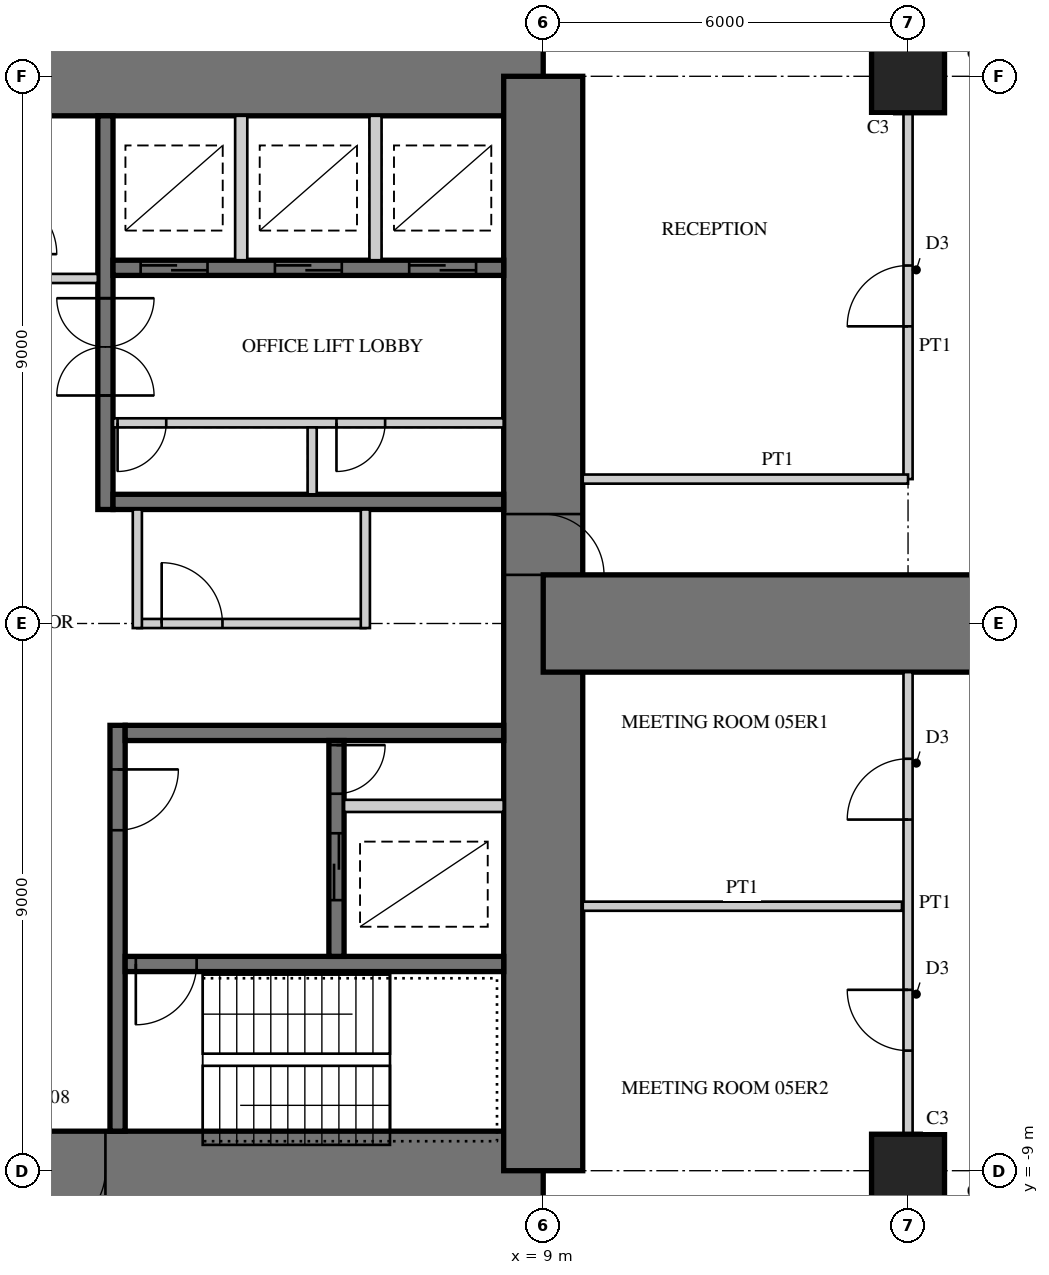
"""IFC4 building model, lengths in metres.
Left out: names, types, materials, properties, quantities, classifications, styles, units other than length and angle.
Written with IfcOpenShell. Run it as: python <this file> out.ifc"""

import sys

from ifc_helpers import new_model, si_unit, direction, frame, frame_2d, origin, origin_2d, place, context, subcontext, project, spatial, rectangle, extrude, element, fill, save


model = new_model("IFC4")
c1 = context("Model", 3, precision=1e-05, world=origin(), true_north=direction((0.0, 1.0)))
c2 = subcontext(c1, "Body", "Model", "MODEL_VIEW")
j1 = project(units=[si_unit("LENGTHUNIT", "METRE"), si_unit("PLANEANGLEUNIT", "RADIAN")], contexts=[c1])
p1 = place(None, origin())
s1 = spatial("IfcSite", under=j1, at=p1, CompositionType="ELEMENT")
p2 = place(p1, origin())
s2 = spatial("IfcBuilding", under=s1, at=p2, CompositionType="ELEMENT")
p3 = place(p2, frame((0.0, 0.0, 23.5)))
s3 = spatial("IfcBuildingStorey", under=s2, at=p3, CompositionType="ELEMENT", Elevation=23.5)
p4 = place(p3, frame((9.0, 9.0, 0.0), z_axis=(0.0, 0.0, 1.0), x_axis=(-1.0, 0.0, 0.0)))
e1 = element("IfcWall", 1, at=p4, inside=s3, PredefinedType="SHEAR", context=c2, shape_type="SweptSolid", body=[
    extrude(rectangle(XDim=18.0, YDim=1.3, at=frame_2d((9.0, 0.0))), origin(), (0.0, 0.0, 1.0), 4.0),
])
p5 = place(p4, frame((9.8, 0.0, 0.0)))
e2 = element("IfcOpeningElement", 2, at=p5, cuts=e1, PredefinedType="OPENING", context=c2, shape_type="SweptSolid", body=[
    extrude(rectangle(XDim=1.0, YDim=2.4, at=frame_2d((0.5, 1.2))), frame((0.0, 0.66, 0.0), z_axis=(0.0, -1.0, 0.0), x_axis=(1.0, 0.0, 0.0)), (0.0, 0.0, 1.0), 1.32),
])
p6 = place(p3, frame((-9.0, -9.0, 0.0), z_axis=(0.0, 0.0, 1.0), x_axis=(1.0, 0.0, 0.0)))
e3 = element("IfcWall", 3, at=p6, inside=s3, PredefinedType="SHEAR", context=c2, shape_type="SweptSolid", body=[
    extrude(rectangle(XDim=18.0, YDim=1.3, at=frame_2d((9.0, 0.0))), origin(), (0.0, 0.0, 1.0), 4.0),
])
p7 = place(p6, frame((9.8, 0.0, 0.0)))
e4 = element("IfcOpeningElement", 4, at=p7, cuts=e3, PredefinedType="OPENING", context=c2, shape_type="SweptSolid", body=[
    extrude(rectangle(XDim=1.0, YDim=2.4, at=frame_2d((0.5, 1.2))), frame((0.0, 0.66, 0.0), z_axis=(0.0, -1.0, 0.0), x_axis=(1.0, 0.0, 0.0)), (0.0, 0.0, 1.0), 1.32),
])
p8 = place(p3, frame((9.0, -9.0, 0.0), z_axis=(0.0, 0.0, 1.0), x_axis=(0.0, 1.0, 0.0)))
e5 = element("IfcWall", 5, at=p8, inside=s3, PredefinedType="SHEAR", context=c2, shape_type="SweptSolid", body=[
    extrude(rectangle(XDim=18.0, YDim=1.3, at=frame_2d((9.0, 0.0))), origin(), (0.0, 0.0, 1.0), 4.0),
])
p9 = place(p8, frame((9.8, 0.0, 0.0)))
e6 = element("IfcOpeningElement", 6, at=p9, cuts=e5, PredefinedType="OPENING", context=c2, shape_type="SweptSolid", body=[
    extrude(rectangle(XDim=1.0, YDim=2.4, at=frame_2d((0.5, 1.2))), frame((0.0, 0.66, 0.0), z_axis=(0.0, -1.0, 0.0), x_axis=(1.0, 0.0, 0.0)), (0.0, 0.0, 1.0), 1.32),
])
p10 = place(p3, frame((1.8, 1.875, 0.0), z_axis=(0.0, 0.0, 1.0), x_axis=(0.0, 1.0, 0.0)))
e7 = element("IfcWall", 7, at=p10, inside=s3, PredefinedType="SHEAR", context=c2, shape_type="SweptSolid", body=[
    extrude(rectangle(XDim=6.475, YDim=0.25, at=frame_2d((3.238, 0.0))), origin(), (0.0, 0.0, 1.0), 4.0),
])
p11 = place(p10, frame((1.875, 0.0, 0.0)))
e8 = element("IfcOpeningElement", 8, at=p11, cuts=e7, PredefinedType="OPENING", context=c2, shape_type="SweptSolid", body=[
    extrude(rectangle(XDim=1.6, YDim=2.4, at=frame_2d((0.8, 1.2))), frame((0.0, 0.135, 0.0), z_axis=(0.0, -1.0, 0.0), x_axis=(1.0, 0.0, 0.0)), (0.0, 0.0, 1.0), 0.27),
])
p12 = place(p3, frame((1.925, 2.0, 0.0), z_axis=(0.0, 0.0, 1.0), x_axis=(1.0, 0.0, 0.0)))
e9 = element("IfcWall", 9, at=p12, inside=s3, PredefinedType="SHEAR", context=c2, shape_type="SweptSolid", body=[
    extrude(rectangle(XDim=6.425, YDim=0.25, at=frame_2d((3.212, 0.0))), origin(), (0.0, 0.0, 1.0), 4.0),
])
p13 = place(p3, frame((1.925, 5.85, 0.0), z_axis=(0.0, 0.0, 1.0), x_axis=(1.0, 0.0, 0.0)))
e10 = element("IfcWall", 10, at=p13, inside=s3, PredefinedType="SHEAR", context=c2, shape_type="SweptSolid", body=[
    extrude(rectangle(XDim=6.425, YDim=0.25, at=frame_2d((3.212, 0.0))), origin(), (0.0, 0.0, 1.0), 4.0),
])
p14 = place(p13, frame((0.454, 0.0, 0.0)))
e11 = element("IfcOpeningElement", 11, at=p14, cuts=e10, PredefinedType="OPENING", context=c2, shape_type="SweptSolid", body=[
    extrude(rectangle(XDim=1.1, YDim=2.2, at=frame_2d((0.55, 1.1))), frame((0.0, 0.135, 0.0), z_axis=(0.0, -1.0, 0.0), x_axis=(1.0, 0.0, 0.0)), (0.0, 0.0, 1.0), 0.27),
])
p15 = place(p13, frame((2.663, 0.0, 0.0)))
e12 = element("IfcOpeningElement", 12, at=p15, cuts=e10, PredefinedType="OPENING", context=c2, shape_type="SweptSolid", body=[
    extrude(rectangle(XDim=1.1, YDim=2.2, at=frame_2d((0.55, 1.1))), frame((0.0, 0.135, 0.0), z_axis=(0.0, -1.0, 0.0), x_axis=(1.0, 0.0, 0.0)), (0.0, 0.0, 1.0), 0.27),
])
p16 = place(p13, frame((4.871, 0.0, 0.0)))
e13 = element("IfcOpeningElement", 13, at=p16, cuts=e10, PredefinedType="OPENING", context=c2, shape_type="SweptSolid", body=[
    extrude(rectangle(XDim=1.1, YDim=2.2, at=frame_2d((0.55, 1.1))), frame((0.0, 0.135, 0.0), z_axis=(0.0, -1.0, 0.0), x_axis=(1.0, 0.0, 0.0)), (0.0, 0.0, 1.0), 0.27),
])
p17 = place(p3, frame((1.925, 3.3, 0.0), z_axis=(0.0, 0.0, 1.0), x_axis=(1.0, 0.0, 0.0)))
e14 = element("IfcWall", 14, at=p17, inside=s3, PredefinedType="PARTITIONING", context=c2, shape_type="SweptSolid", body=[
    extrude(rectangle(XDim=6.425, YDim=0.15, at=frame_2d((3.212, 0.0))), origin(), (0.0, 0.0, 1.0), 4.0),
])
p18 = place(p17, frame((0.075, 0.0, 0.0)))
e15 = element("IfcOpeningElement", 15, at=p18, cuts=e14, PredefinedType="OPENING", context=c2, shape_type="SweptSolid", body=[
    extrude(rectangle(XDim=0.8, YDim=2.1, at=frame_2d((0.4, 1.05))), frame((0.0, 0.085, 0.0), z_axis=(0.0, -1.0, 0.0), x_axis=(1.0, 0.0, 0.0)), (0.0, 0.0, 1.0), 0.17),
])
p19 = place(p17, frame((3.675, 0.0, 0.0)))
e16 = element("IfcOpeningElement", 16, at=p19, cuts=e14, PredefinedType="OPENING", context=c2, shape_type="SweptSolid", body=[
    extrude(rectangle(XDim=0.8, YDim=2.1, at=frame_2d((0.4, 1.05))), frame((0.0, 0.085, 0.0), z_axis=(0.0, -1.0, 0.0), x_axis=(1.0, 0.0, 0.0)), (0.0, 0.0, 1.0), 0.17),
])
p20 = place(p3, frame((5.2, 2.125, 0.0), z_axis=(0.0, 0.0, 1.0), x_axis=(0.0, 1.0, 0.0)))
e17 = element("IfcWall", 17, at=p20, inside=s3, PredefinedType="PARTITIONING", context=c2, shape_type="SweptSolid", body=[
    extrude(rectangle(XDim=1.1, YDim=0.15, at=frame_2d((0.55, 0.0))), origin(), (0.0, 0.0, 1.0), 4.0),
])
for number, where, z_axis, x_axis in (
    (18, (4.033, 5.975, 0.0), (0.0, 0.0, 1.0), (0.0, 1.0, 0.0)),
    (19, (6.242, 5.975, 0.0), (0.0, 0.0, 1.0), (0.0, 1.0, 0.0)),
):
    element("IfcWall", number, at=place(p3, frame(where, z_axis=z_axis, x_axis=x_axis)), inside=s3, PredefinedType="PARTITIONING", context=c2, shape_type="SweptSolid", body=[
        extrude(rectangle(XDim=2.375, YDim=0.2, at=frame_2d((1.188, 0.0))), origin(), (0.0, 0.0, 1.0), 4.0),
    ])
p21 = place(p3, frame((2.0, -1.675, 0.0), z_axis=(0.0, 0.0, 1.0), x_axis=(0.0, -1.0, 0.0)))
e20 = element("IfcWall", 20, at=p21, inside=s3, PredefinedType="SHEAR", context=c2, shape_type="SweptSolid", body=[
    extrude(rectangle(XDim=6.675, YDim=0.25, at=frame_2d((3.337, 0.0))), origin(), (0.0, 0.0, 1.0), 4.0),
])
p22 = place(p21, frame((0.725, 0.0, 0.0)))
e21 = element("IfcOpeningElement", 21, at=p22, cuts=e20, PredefinedType="OPENING", context=c2, shape_type="SweptSolid", body=[
    extrude(rectangle(XDim=1.0, YDim=2.1, at=frame_2d((0.5, 1.05))), frame((0.0, 0.135, 0.0), z_axis=(0.0, -1.0, 0.0), x_axis=(1.0, 0.0, 0.0)), (0.0, 0.0, 1.0), 0.27),
])
p23 = place(p3, frame((2.125, -1.8, 0.0), z_axis=(0.0, 0.0, 1.0), x_axis=(1.0, 0.0, 0.0)))
e22 = element("IfcWall", 22, at=p23, inside=s3, PredefinedType="SHEAR", context=c2, shape_type="SweptSolid", body=[
    extrude(rectangle(XDim=6.225, YDim=0.25, at=frame_2d((3.113, 0.0))), origin(), (0.0, 0.0, 1.0), 4.0),
])
p24 = place(p3, frame((2.125, -5.6, 0.0), z_axis=(0.0, 0.0, 1.0), x_axis=(1.0, 0.0, 0.0)))
e23 = element("IfcWall", 23, at=p24, inside=s3, PredefinedType="SHEAR", context=c2, shape_type="SweptSolid", body=[
    extrude(rectangle(XDim=6.225, YDim=0.25, at=frame_2d((3.113, 0.0))), origin(), (0.0, 0.0, 1.0), 4.0),
])
p25 = place(p24, frame((0.175, 0.0, 0.0)))
e24 = element("IfcOpeningElement", 24, at=p25, cuts=e23, PredefinedType="OPENING", context=c2, shape_type="SweptSolid", body=[
    extrude(rectangle(XDim=1.0, YDim=2.1, at=frame_2d((0.5, 1.05))), frame((0.0, 0.135, 0.0), z_axis=(0.0, -1.0, 0.0), x_axis=(1.0, 0.0, 0.0)), (0.0, 0.0, 1.0), 0.27),
])
p26 = place(p3, frame((5.6, -1.925, 0.0), z_axis=(0.0, 0.0, 1.0), x_axis=(0.0, -1.0, 0.0)))
e25 = element("IfcWall", 25, at=p26, inside=s3, PredefinedType="SHEAR", context=c2, shape_type="SweptSolid", body=[
    extrude(rectangle(XDim=3.55, YDim=0.25, at=frame_2d((1.775, 0.0))), origin(), (0.0, 0.0, 1.0), 4.0),
])
p27 = place(p26, frame((1.525, 0.0, 0.0)))
e26 = element("IfcOpeningElement", 26, at=p27, cuts=e25, PredefinedType="OPENING", context=c2, shape_type="SweptSolid", body=[
    extrude(rectangle(XDim=1.1, YDim=2.2, at=frame_2d((0.55, 1.1))), frame((0.0, 0.135, 0.0), z_axis=(0.0, -1.0, 0.0), x_axis=(1.0, 0.0, 0.0)), (0.0, 0.0, 1.0), 0.27),
])
p28 = place(p26, frame((0.075, 0.0, 0.0)))
e27 = element("IfcOpeningElement", 27, at=p28, cuts=e25, PredefinedType="OPENING", context=c2, shape_type="SweptSolid", body=[
    extrude(rectangle(XDim=0.8, YDim=2.1, at=frame_2d((0.4, 1.05))), frame((0.0, 0.135, 0.0), z_axis=(0.0, -1.0, 0.0), x_axis=(1.0, 0.0, 0.0)), (0.0, 0.0, 1.0), 0.27),
])
p29 = place(p3, frame((5.725, -3.0, 0.0), z_axis=(0.0, 0.0, 1.0), x_axis=(1.0, 0.0, 0.0)))
e28 = element("IfcWall", 28, at=p29, inside=s3, PredefinedType="PARTITIONING", context=c2, shape_type="SweptSolid", body=[
    extrude(rectangle(XDim=2.625, YDim=0.2, at=frame_2d((1.312, 0.0))), origin(), (0.0, 0.0, 1.0), 4.0),
])
p30 = place(p3, frame((9.0, 0.0, 0.0), z_axis=(0.0, 0.0, 1.0), x_axis=(1.0, 0.0, 0.0)))
e29 = element("IfcWall", 29, at=p30, inside=s3, PredefinedType="SHEAR", context=c2, shape_type="SweptSolid", body=[
    extrude(rectangle(XDim=18.0, YDim=1.6, at=frame_2d((9.0, 0.0))), origin(), (0.0, 0.0, 1.0), 4.0),
])
p31 = place(p30, frame((9.9, 0.0, 0.0)))
e30 = element("IfcOpeningElement", 30, at=p31, cuts=e29, PredefinedType="OPENING", context=c2, shape_type="SweptSolid", body=[
    extrude(rectangle(XDim=1.0, YDim=2.2, at=frame_2d((0.5, 1.1))), frame((0.0, 0.81, 0.0), z_axis=(0.0, -1.0, 0.0), x_axis=(1.0, 0.0, 0.0)), (0.0, 0.0, 1.0), 1.62),
])
for number, where, z_axis, x_axis in (
    (31, (15.0, -9.0, 0.0), (0.0, 0.0, 1.0), (1.0, 0.0, 0.0)),
    (32, (15.0, 9.0, 0.0), (0.0, 0.0, 1.0), (1.0, 0.0, 0.0)),
):
    element("IfcColumn", number, at=place(p3, frame(where, z_axis=z_axis, x_axis=x_axis)), inside=s3, PredefinedType="COLUMN", context=c2, shape_type="SweptSolid", body=[
        extrude(rectangle(XDim=1.2, YDim=1.2, at=origin_2d()), origin(), (0.0, 0.0, 1.0), 4.0),
    ])
p32 = place(p3, frame((2.325, 0.0, 0.0), z_axis=(0.0, 0.0, 1.0), x_axis=(1.0, 0.0, 0.0)))
e33 = element("IfcWall", 33, at=p32, inside=s3, PredefinedType="PARTITIONING", context=c2, shape_type="SweptSolid", body=[
    extrude(rectangle(XDim=3.75, YDim=0.15, at=frame_2d((1.875, 0.0))), origin(), (0.0, 0.0, 1.0), 3.8),
])
p33 = place(p32, frame((0.4, 0.0, 0.0)))
e34 = element("IfcOpeningElement", 34, at=p33, cuts=e33, PredefinedType="OPENING", context=c2, shape_type="SweptSolid", body=[
    extrude(rectangle(XDim=1.0, YDim=2.1, at=frame_2d((0.5, 1.05))), frame((0.0, 0.085, 0.0), z_axis=(0.0, -1.0, 0.0), x_axis=(1.0, 0.0, 0.0)), (0.0, 0.0, 1.0), 0.17),
])
for number, where, z_axis, x_axis in (
    (35, (2.325, 1.875, 0.0), (0.0, 0.0, 1.0), (0.0, -1.0, 0.0)),
    (36, (6.075, -0.075, 0.0), (0.0, 0.0, 1.0), (0.0, 1.0, 0.0)),
):
    element("IfcWall", number, at=place(p3, frame(where, z_axis=z_axis, x_axis=x_axis)), inside=s3, PredefinedType="PARTITIONING", context=c2, shape_type="SweptSolid", body=[
        extrude(rectangle(XDim=1.95, YDim=0.15, at=frame_2d((0.975, 0.0))), origin(), (0.0, 0.0, 1.0), 3.8),
    ])
p34 = place(p3, frame((1.675, 5.675, 0.0), z_axis=(0.0, 0.0, 1.0), x_axis=(-1.0, 0.0, 0.0)))
e37 = element("IfcWall", 37, at=p34, inside=s3, PredefinedType="PARTITIONING", context=c2, shape_type="SweptSolid", body=[
    extrude(rectangle(XDim=1.75, YDim=0.15, at=frame_2d((0.875, 0.0))), origin(), (0.0, 0.0, 1.0), 3.8),
])
p35 = place(p3, frame((15.0, 2.375, 0.0), z_axis=(0.0, 0.0, 1.0), x_axis=(0.0, 1.0, 0.0)))
e38 = element("IfcWall", 38, at=p35, inside=s3, PredefinedType="PARTITIONING", context=c2, shape_type="SweptSolid", body=[
    extrude(rectangle(XDim=6.025, YDim=0.15, at=frame_2d((3.012, 0.0))), origin(), (0.0, 0.0, 1.0), 2.95),
])
p36 = place(p35, frame((2.512, 0.0, 0.0)))
e39 = element("IfcOpeningElement", 39, at=p36, cuts=e38, PredefinedType="OPENING", context=c2, shape_type="SweptSolid", body=[
    extrude(rectangle(XDim=1.0, YDim=2.1, at=frame_2d((0.5, 1.05))), frame((0.0, 0.085, 0.0), z_axis=(0.0, -1.0, 0.0), x_axis=(1.0, 0.0, 0.0)), (0.0, 0.0, 1.0), 0.17),
])
p37 = place(p3, frame((9.65, 2.375, 0.0), z_axis=(0.0, 0.0, 1.0), x_axis=(1.0, 0.0, 0.0)))
e40 = element("IfcWall", 40, at=p37, inside=s3, PredefinedType="PARTITIONING", context=c2, shape_type="SweptSolid", body=[
    extrude(rectangle(XDim=5.35, YDim=0.15, at=frame_2d((2.675, 0.0))), origin(), (0.0, 0.0, 1.0), 3.8),
])
p38 = place(p3, frame((15.0, -8.4, 0.0), z_axis=(0.0, 0.0, 1.0), x_axis=(0.0, 1.0, 0.0)))
e41 = element("IfcWall", 41, at=p38, inside=s3, PredefinedType="PARTITIONING", context=c2, shape_type="SweptSolid", body=[
    extrude(rectangle(XDim=7.6, YDim=0.15, at=frame_2d((3.8, 0.0))), origin(), (0.0, 0.0, 1.0), 2.95),
])
p39 = place(p38, frame((1.375, 0.0, 0.0)))
e42 = element("IfcOpeningElement", 42, at=p39, cuts=e41, PredefinedType="OPENING", context=c2, shape_type="SweptSolid", body=[
    extrude(rectangle(XDim=1.0, YDim=2.1, at=frame_2d((0.5, 1.05))), frame((0.0, 0.085, 0.0), z_axis=(0.0, -1.0, 0.0), x_axis=(1.0, 0.0, 0.0)), (0.0, 0.0, 1.0), 0.17),
])
p40 = place(p38, frame((5.175, 0.0, 0.0)))
e43 = element("IfcOpeningElement", 43, at=p40, cuts=e41, PredefinedType="OPENING", context=c2, shape_type="SweptSolid", body=[
    extrude(rectangle(XDim=1.0, YDim=2.1, at=frame_2d((0.5, 1.05))), frame((0.0, 0.085, 0.0), z_axis=(0.0, -1.0, 0.0), x_axis=(1.0, 0.0, 0.0)), (0.0, 0.0, 1.0), 0.17),
])
p41 = place(p3, frame((9.65, -4.65, 0.0), z_axis=(0.0, 0.0, 1.0), x_axis=(1.0, 0.0, 0.0)))
e44 = element("IfcWall", 44, at=p41, inside=s3, PredefinedType="PARTITIONING", context=c2, shape_type="SweptSolid", body=[
    extrude(rectangle(XDim=5.25, YDim=0.15, at=frame_2d((2.625, 0.0))), origin(), (0.0, 0.0, 1.0), 3.8),
])
p42 = place(p33, origin())
e45 = element("IfcDoor", 45, at=p42, inside=s3, OperationType="SINGLE_SWING_LEFT", PredefinedType="DOOR", context=c2, shape_type="SweptSolid", body=[
    extrude(rectangle(XDim=1.0, YDim=2.1, at=frame_2d((0.5, 1.05))), frame((0.0, 0.025, 0.0), z_axis=(0.0, -1.0, 0.0), x_axis=(1.0, 0.0, 0.0)), (0.0, 0.0, 1.0), 0.05),
])
fill(e34, e45)
p43 = place(p36, origin())
e46 = element("IfcDoor", 46, at=p43, inside=s3, OperationType="SINGLE_SWING_LEFT", PredefinedType="DOOR", context=c2, shape_type="SweptSolid", body=[
    extrude(rectangle(XDim=1.0, YDim=2.1, at=frame_2d((0.5, 1.05))), frame((0.0, 0.025, 0.0), z_axis=(0.0, -1.0, 0.0), x_axis=(1.0, 0.0, 0.0)), (0.0, 0.0, 1.0), 0.05),
])
fill(e39, e46)
p44 = place(p39, origin())
e47 = element("IfcDoor", 47, at=p44, inside=s3, OperationType="SINGLE_SWING_RIGHT", PredefinedType="DOOR", context=c2, shape_type="SweptSolid", body=[
    extrude(rectangle(XDim=1.0, YDim=2.1, at=frame_2d((0.5, 1.05))), frame((0.0, 0.025, 0.0), z_axis=(0.0, -1.0, 0.0), x_axis=(1.0, 0.0, 0.0)), (0.0, 0.0, 1.0), 0.05),
])
fill(e42, e47)
p45 = place(p40, origin())
e48 = element("IfcDoor", 48, at=p45, inside=s3, OperationType="SINGLE_SWING_LEFT", PredefinedType="DOOR", context=c2, shape_type="SweptSolid", body=[
    extrude(rectangle(XDim=1.0, YDim=2.1, at=frame_2d((0.5, 1.05))), frame((0.0, 0.025, 0.0), z_axis=(0.0, -1.0, 0.0), x_axis=(1.0, 0.0, 0.0)), (0.0, 0.0, 1.0), 0.05),
])
fill(e43, e48)
p46 = place(p7, frame((1.0, 0.0, 0.0), z_axis=(0.0, 0.0, 1.0), x_axis=(-1.0, 0.0, 0.0)))
e49 = element("IfcDoor", 49, at=p46, inside=s3, OperationType="SINGLE_SWING_RIGHT", PredefinedType="DOOR", context=c2, shape_type="SweptSolid", body=[
    extrude(rectangle(XDim=1.0, YDim=2.4, at=frame_2d((0.5, 1.2))), frame((0.0, -0.005, 0.0), z_axis=(0.0, -1.0, 0.0), x_axis=(1.0, 0.0, 0.0)), (0.0, 0.0, 1.0), 0.05),
])
fill(e4, e49)
p47 = place(p9, frame((1.0, 0.0, 0.0), z_axis=(0.0, 0.0, 1.0), x_axis=(-1.0, 0.0, 0.0)))
e50 = element("IfcDoor", 50, at=p47, inside=s3, OperationType="SINGLE_SWING_RIGHT", PredefinedType="DOOR", context=c2, shape_type="SweptSolid", body=[
    extrude(rectangle(XDim=1.0, YDim=2.4, at=frame_2d((0.5, 1.2))), frame((0.0, -0.005, 0.0), z_axis=(0.0, -1.0, 0.0), x_axis=(1.0, 0.0, 0.0)), (0.0, 0.0, 1.0), 0.05),
])
fill(e6, e50)
p48 = place(p14, origin())
e51 = element("IfcDoor", 51, at=p48, inside=s3, OperationType="DOUBLE_DOOR_SLIDING", PredefinedType="DOOR", context=c2, shape_type="SweptSolid", body=[
    extrude(rectangle(XDim=1.1, YDim=2.2, at=frame_2d((0.55, 1.1))), frame((0.0, 0.025, 0.0), z_axis=(0.0, -1.0, 0.0), x_axis=(1.0, 0.0, 0.0)), (0.0, 0.0, 1.0), 0.05),
])
fill(e11, e51)
p49 = place(p15, origin())
e52 = element("IfcDoor", 52, at=p49, inside=s3, OperationType="DOUBLE_DOOR_SLIDING", PredefinedType="DOOR", context=c2, shape_type="SweptSolid", body=[
    extrude(rectangle(XDim=1.1, YDim=2.2, at=frame_2d((0.55, 1.1))), frame((0.0, 0.025, 0.0), z_axis=(0.0, -1.0, 0.0), x_axis=(1.0, 0.0, 0.0)), (0.0, 0.0, 1.0), 0.05),
])
fill(e12, e52)
p50 = place(p16, origin())
e53 = element("IfcDoor", 53, at=p50, inside=s3, OperationType="DOUBLE_DOOR_SLIDING", PredefinedType="DOOR", context=c2, shape_type="SweptSolid", body=[
    extrude(rectangle(XDim=1.1, YDim=2.2, at=frame_2d((0.55, 1.1))), frame((0.0, 0.025, 0.0), z_axis=(0.0, -1.0, 0.0), x_axis=(1.0, 0.0, 0.0)), (0.0, 0.0, 1.0), 0.05),
])
fill(e13, e53)
p51 = place(p11, origin())
e54 = element("IfcDoor", 54, at=p51, inside=s3, OperationType="DOUBLE_DOOR_DOUBLE_SWING", PredefinedType="DOOR", context=c2, shape_type="SweptSolid", body=[
    extrude(rectangle(XDim=1.6, YDim=2.4, at=frame_2d((0.8, 1.2))), frame((0.0, 0.025, 0.0), z_axis=(0.0, -1.0, 0.0), x_axis=(1.0, 0.0, 0.0)), (0.0, 0.0, 1.0), 0.05),
])
fill(e8, e54)
p52 = place(p18, frame((0.8, 0.0, 0.0), z_axis=(0.0, 0.0, 1.0), x_axis=(-1.0, 0.0, 0.0)))
e55 = element("IfcDoor", 55, at=p52, inside=s3, OperationType="SINGLE_SWING_RIGHT", PredefinedType="DOOR", context=c2, shape_type="SweptSolid", body=[
    extrude(rectangle(XDim=0.8, YDim=2.1, at=frame_2d((0.4, 1.05))), frame((0.0, 0.025, 0.0), z_axis=(0.0, -1.0, 0.0), x_axis=(1.0, 0.0, 0.0)), (0.0, 0.0, 1.0), 0.05),
])
fill(e15, e55)
p53 = place(p19, frame((0.8, 0.0, 0.0), z_axis=(0.0, 0.0, 1.0), x_axis=(-1.0, 0.0, 0.0)))
e56 = element("IfcDoor", 56, at=p53, inside=s3, OperationType="SINGLE_SWING_RIGHT", PredefinedType="DOOR", context=c2, shape_type="SweptSolid", body=[
    extrude(rectangle(XDim=0.8, YDim=2.1, at=frame_2d((0.4, 1.05))), frame((0.0, 0.025, 0.0), z_axis=(0.0, -1.0, 0.0), x_axis=(1.0, 0.0, 0.0)), (0.0, 0.0, 1.0), 0.05),
])
fill(e16, e56)
p54 = place(p22, origin())
e57 = element("IfcDoor", 57, at=p54, inside=s3, OperationType="SINGLE_SWING_LEFT", PredefinedType="DOOR", context=c2, shape_type="SweptSolid", body=[
    extrude(rectangle(XDim=1.0, YDim=2.1, at=frame_2d((0.5, 1.05))), frame((0.0, 0.025, 0.0), z_axis=(0.0, -1.0, 0.0), x_axis=(1.0, 0.0, 0.0)), (0.0, 0.0, 1.0), 0.05),
])
fill(e21, e57)
p55 = place(p25, frame((1.0, 0.0, 0.0), z_axis=(0.0, 0.0, 1.0), x_axis=(-1.0, 0.0, 0.0)))
e58 = element("IfcDoor", 58, at=p55, inside=s3, OperationType="SINGLE_SWING_RIGHT", PredefinedType="DOOR", context=c2, shape_type="SweptSolid", body=[
    extrude(rectangle(XDim=1.0, YDim=2.1, at=frame_2d((0.5, 1.05))), frame((0.0, 0.025, 0.0), z_axis=(0.0, -1.0, 0.0), x_axis=(1.0, 0.0, 0.0)), (0.0, 0.0, 1.0), 0.05),
])
fill(e24, e58)
p56 = place(p27, origin())
e59 = element("IfcDoor", 59, at=p56, inside=s3, OperationType="DOUBLE_DOOR_SLIDING", PredefinedType="DOOR", context=c2, shape_type="SweptSolid", body=[
    extrude(rectangle(XDim=1.1, YDim=2.2, at=frame_2d((0.55, 1.1))), frame((0.0, 0.025, 0.0), z_axis=(0.0, -1.0, 0.0), x_axis=(1.0, 0.0, 0.0)), (0.0, 0.0, 1.0), 0.05),
])
fill(e26, e59)
p57 = place(p28, origin())
e60 = element("IfcDoor", 60, at=p57, inside=s3, OperationType="SINGLE_SWING_LEFT", PredefinedType="DOOR", context=c2, shape_type="SweptSolid", body=[
    extrude(rectangle(XDim=0.8, YDim=2.1, at=frame_2d((0.4, 1.05))), frame((0.0, 0.025, 0.0), z_axis=(0.0, -1.0, 0.0), x_axis=(1.0, 0.0, 0.0)), (0.0, 0.0, 1.0), 0.05),
])
fill(e27, e60)
save(model, sys.argv[1])
